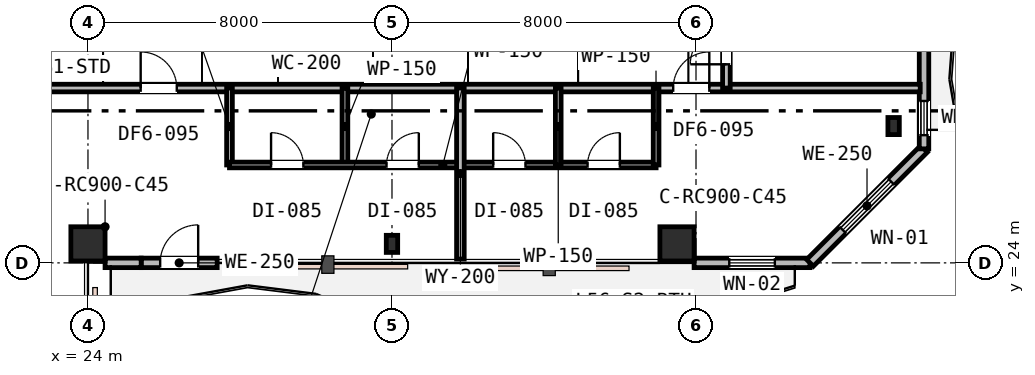
"""IFC4 building model, lengths in metres.
Left out: names, types, materials, properties, quantities, classifications, styles, units other than length and angle.
Written with IfcOpenShell. Run it as: python <this file> out.ifc"""

import sys

from ifc_helpers import new_model, si_unit, direction, frame, frame_2d, origin, origin_2d, place, context, subcontext, project, spatial, rectangle, i_section, extrude, element, fill, save


model = new_model("IFC4")
c1 = context("Model", 3, precision=1e-05, world=origin(), true_north=direction((0.0, 1.0)))
c2 = subcontext(c1, "Body", "Model", "MODEL_VIEW")
j1 = project(units=[si_unit("LENGTHUNIT", "METRE"), si_unit("PLANEANGLEUNIT", "RADIAN")], contexts=[c1])
p1 = place(None, origin())
s1 = spatial("IfcSite", under=j1, at=p1, CompositionType="ELEMENT")
p2 = place(p1, origin())
s2 = spatial("IfcBuilding", under=s1, at=p2, CompositionType="ELEMENT")
p3 = place(p2, frame((0.0, 0.0, 218.4)))
s3 = spatial("IfcBuildingStorey", under=s2, at=p3, CompositionType="ELEMENT", Elevation=218.4)
p4 = place(p3, frame((24.0, 24.5, 0.0), z_axis=(0.0, 0.0, 1.0), x_axis=(1.0, 0.0, 0.0)))
e1 = element("IfcColumn", 1, at=p4, inside=s3, PredefinedType="COLUMN", context=c2, shape_type="SweptSolid", body=[
    extrude(rectangle(XDim=0.9, YDim=0.9, at=origin_2d()), origin(), (0.0, 0.0, 1.0), 3.8),
])
p5 = place(p3, frame((32.0, 24.5, 0.0), z_axis=(0.0, 0.0, 1.0), x_axis=(1.0, 0.0, 0.0)))
e2 = element("IfcColumn", 2, at=p5, inside=s3, PredefinedType="COLUMN", context=c2, shape_type="SweptSolid", body=[
    extrude(i_section(OverallWidth=0.3, OverallDepth=0.45, WebThickness=0.014, FlangeThickness=0.026, FilletRadius=0.027, at=origin_2d()), origin(), (0.0, 0.0, 1.0), 3.8),
])
p6 = place(p3, frame((39.5, 24.5, 0.0), z_axis=(0.0, 0.0, 1.0), x_axis=(1.0, 0.0, 0.0)))
e3 = element("IfcColumn", 3, at=p6, inside=s3, PredefinedType="COLUMN", context=c2, shape_type="SweptSolid", body=[
    extrude(rectangle(XDim=0.9, YDim=0.9, at=origin_2d()), origin(), (0.0, 0.0, 1.0), 3.8),
])
p7 = place(p3, frame((45.2, 27.6, 0.0), z_axis=(0.0, 0.0, 1.0), x_axis=(1.0, 0.0, 0.0)))
e4 = element("IfcColumn", 4, at=p7, inside=s3, PredefinedType="COLUMN", context=c2, shape_type="SweptSolid", body=[
    extrude(i_section(OverallWidth=0.3, OverallDepth=0.45, WebThickness=0.014, FlangeThickness=0.026, FilletRadius=0.027, at=origin_2d()), origin(), (0.0, 0.0, 1.0), 3.8),
])
p8 = place(p3, frame((25.4, 24.0, 0.0), z_axis=(0.0, 0.0, 1.0), x_axis=(1.0, 0.0, 0.0)))
e5 = element("IfcWall", 5, at=p8, inside=s3, PredefinedType="STANDARD", context=c2, shape_type="SweptSolid", body=[
    extrude(rectangle(XDim=2.0, YDim=0.25, at=frame_2d((1.0, 0.0))), origin(), (0.0, 0.0, 1.0), 3.24),
])
p9 = place(p8, frame((0.5, 0.0, 0.0)))
e6 = element("IfcOpeningElement", 6, at=p9, cuts=e5, PredefinedType="OPENING", context=c2, shape_type="SweptSolid", body=[
    extrude(rectangle(XDim=1.0, YDim=2.15, at=frame_2d((0.5, 1.075))), frame((0.0, 0.135, 0.0), z_axis=(0.0, -1.0, 0.0), x_axis=(1.0, 0.0, 0.0)), (0.0, 0.0, 1.0), 0.27),
])
p10 = place(p3, frame((24.45, 24.0, 0.0), z_axis=(0.0, 0.0, 1.0), x_axis=(1.0, 0.0, 0.0)))
e7 = element("IfcWall", 7, at=p10, inside=s3, PredefinedType="STANDARD", context=c2, shape_type="SweptSolid", body=[
    extrude(rectangle(XDim=0.95, YDim=0.25, at=frame_2d((0.475, 0.0))), origin(), (0.0, 0.0, 1.0), 3.24),
])
p11 = place(p3, frame((39.95, 24.0, 0.0), z_axis=(0.0, 0.0, 1.0), x_axis=(1.0, 0.0, 0.0)))
e8 = element("IfcWall", 8, at=p11, inside=s3, PredefinedType="STANDARD", context=c2, shape_type="SweptSolid", body=[
    extrude(rectangle(XDim=3.05, YDim=0.25, at=frame_2d((1.525, 0.0))), origin(), (0.0, 0.0, 1.0), 3.53),
])
p12 = place(p11, frame((0.925, 0.0, 0.85)))
e9 = element("IfcOpeningElement", 9, at=p12, cuts=e8, PredefinedType="OPENING", context=c2, shape_type="SweptSolid", body=[
    extrude(rectangle(XDim=1.2, YDim=1.6, at=frame_2d((0.6, 0.8))), frame((0.0, 0.135, 0.0), z_axis=(0.0, -1.0, 0.0), x_axis=(1.0, 0.0, 0.0)), (0.0, 0.0, 1.0), 0.27),
])
p13 = place(p3, frame((43.0, 24.0, 0.0), z_axis=(0.0, 0.0, 1.0), x_axis=(0.707106781187, 0.707106781187, 0.0)))
e10 = element("IfcWall", 10, at=p13, inside=s3, PredefinedType="STANDARD", context=c2, shape_type="SweptSolid", body=[
    extrude(rectangle(XDim=4.243, YDim=0.25, at=frame_2d((2.121, 0.0))), origin(), (0.0, 0.0, 1.0), 3.53),
])
p14 = place(p13, frame((1.221, 0.0, 0.75)))
e11 = element("IfcOpeningElement", 11, at=p14, cuts=e10, PredefinedType="OPENING", context=c2, shape_type="SweptSolid", body=[
    extrude(rectangle(XDim=1.8, YDim=1.85, at=frame_2d((0.9, 0.925))), frame((0.0, 0.135, 0.0), z_axis=(0.0, -1.0, 0.0), x_axis=(1.0, 0.0, 0.0)), (0.0, 0.0, 1.0), 0.27),
])
p15 = place(p3, frame((46.0, 27.0, 0.0), z_axis=(0.0, 0.0, 1.0), x_axis=(0.0, 1.0, 0.0)))
e12 = element("IfcWall", 12, at=p15, inside=s3, PredefinedType="STANDARD", context=c2, shape_type="SweptSolid", body=[
    extrude(rectangle(XDim=2.9, YDim=0.25, at=frame_2d((1.45, 0.0))), origin(), (0.0, 0.0, 1.0), 3.53),
])
p16 = place(p15, frame((0.36, 0.0, 0.9)))
e13 = element("IfcOpeningElement", 13, at=p16, cuts=e12, PredefinedType="OPENING", context=c2, shape_type="SweptSolid", body=[
    extrude(rectangle(XDim=0.9, YDim=1.55, at=frame_2d((0.45, 0.775))), frame((0.0, 0.135, 0.0), z_axis=(0.0, -1.0, 0.0), x_axis=(1.0, 0.0, 0.0)), (0.0, 0.0, 1.0), 0.27),
])
p17 = place(p3, frame((13.6, 28.6, 0.0), z_axis=(0.0, 0.0, 1.0), x_axis=(1.0, 0.0, 0.0)))
e14 = element("IfcWall", 14, at=p17, inside=s3, PredefinedType="PARTITIONING", context=c2, shape_type="SweptSolid", body=[
    extrude(rectangle(XDim=32.3, YDim=0.2, at=frame_2d((16.15, 0.0))), origin(), (0.0, 0.0, 1.0), 2.92),
])
p18 = place(p17, frame((11.787, 0.0, 0.0)))
e15 = element("IfcOpeningElement", 15, at=p18, cuts=e14, PredefinedType="OPENING", context=c2, shape_type="SweptSolid", body=[
    extrude(rectangle(XDim=0.95, YDim=2.15, at=frame_2d((0.475, 1.075))), frame((0.0, 0.11, 0.0), z_axis=(0.0, -1.0, 0.0), x_axis=(1.0, 0.0, 0.0)), (0.0, 0.0, 1.0), 0.22),
])
p19 = place(p17, frame((25.8, 0.0, 0.0)))
e16 = element("IfcOpeningElement", 16, at=p19, cuts=e14, PredefinedType="OPENING", context=c2, shape_type="SweptSolid", body=[
    extrude(rectangle(XDim=0.95, YDim=2.15, at=frame_2d((0.475, 1.075))), frame((0.0, 0.11, 0.0), z_axis=(0.0, -1.0, 0.0), x_axis=(1.0, 0.0, 0.0)), (0.0, 0.0, 1.0), 0.22),
])
p20 = place(p3, frame((40.8, 28.6, 0.0), z_axis=(0.0, 0.0, 1.0), x_axis=(0.0, 1.0, 0.0)))
e17 = element("IfcWall", 17, at=p20, inside=s3, PredefinedType="PARTITIONING", context=c2, shape_type="SweptSolid", body=[
    extrude(rectangle(XDim=14.3, YDim=0.2, at=frame_2d((7.15, 0.0))), origin(), (0.0, 0.0, 1.0), 2.92),
])
p21 = place(p20, frame((0.625, 0.0, 0.0)))
e18 = element("IfcOpeningElement", 18, at=p21, cuts=e17, PredefinedType="OPENING", context=c2, shape_type="SweptSolid", body=[
    extrude(rectangle(XDim=0.95, YDim=2.15, at=frame_2d((0.475, 1.075))), frame((0.0, 0.11, 0.0), z_axis=(0.0, -1.0, 0.0), x_axis=(1.0, 0.0, 0.0)), (0.0, 0.0, 1.0), 0.22),
])
for number, where, z_axis, x_axis in (
    (19, (27.724, 26.576, 0.0), (0.0, 0.0, 1.0), (0.0, 1.0, 0.0)),
    (20, (30.762, 26.576, 0.0), (0.0, 0.0, 1.0), (0.0, 1.0, 0.0)),
):
    element("IfcWall", number, at=place(p3, frame(where, z_axis=z_axis, x_axis=x_axis)), inside=s3, PredefinedType="PARTITIONING", context=c2, shape_type="SweptSolid", body=[
        extrude(rectangle(XDim=2.024, YDim=0.15, at=frame_2d((1.012, 0.0))), origin(), (0.0, 0.0, 1.0), 3.53),
    ])
p22 = place(p3, frame((27.724, 26.576, 0.0), z_axis=(0.0, 0.0, 1.0), x_axis=(1.0, 0.0, 0.0)))
e21 = element("IfcWall", 21, at=p22, inside=s3, PredefinedType="PARTITIONING", context=c2, shape_type="SweptSolid", body=[
    extrude(rectangle(XDim=11.226, YDim=0.15, at=frame_2d((5.613, 0.0))), origin(), (0.0, 0.0, 1.0), 2.92),
])
p23 = place(p22, frame((1.094, 0.0, 0.0)))
e22 = element("IfcOpeningElement", 22, at=p23, cuts=e21, PredefinedType="OPENING", context=c2, shape_type="SweptSolid", body=[
    extrude(rectangle(XDim=0.85, YDim=2.15, at=frame_2d((0.425, 1.075))), frame((0.0, 0.085, 0.0), z_axis=(0.0, -1.0, 0.0), x_axis=(1.0, 0.0, 0.0)), (0.0, 0.0, 1.0), 0.17),
])
p24 = place(p22, frame((4.132, 0.0, 0.0)))
e23 = element("IfcOpeningElement", 23, at=p24, cuts=e21, PredefinedType="OPENING", context=c2, shape_type="SweptSolid", body=[
    extrude(rectangle(XDim=0.85, YDim=2.15, at=frame_2d((0.425, 1.075))), frame((0.0, 0.085, 0.0), z_axis=(0.0, -1.0, 0.0), x_axis=(1.0, 0.0, 0.0)), (0.0, 0.0, 1.0), 0.17),
])
p25 = place(p22, frame((6.939, 0.0, 0.0)))
e24 = element("IfcOpeningElement", 24, at=p25, cuts=e21, PredefinedType="OPENING", context=c2, shape_type="SweptSolid", body=[
    extrude(rectangle(XDim=0.85, YDim=2.15, at=frame_2d((0.425, 1.075))), frame((0.0, 0.085, 0.0), z_axis=(0.0, -1.0, 0.0), x_axis=(1.0, 0.0, 0.0)), (0.0, 0.0, 1.0), 0.17),
])
p26 = place(p22, frame((9.422, 0.0, 0.0)))
e25 = element("IfcOpeningElement", 25, at=p26, cuts=e21, PredefinedType="OPENING", context=c2, shape_type="SweptSolid", body=[
    extrude(rectangle(XDim=0.85, YDim=2.15, at=frame_2d((0.425, 1.075))), frame((0.0, 0.085, 0.0), z_axis=(0.0, -1.0, 0.0), x_axis=(1.0, 0.0, 0.0)), (0.0, 0.0, 1.0), 0.17),
])
p27 = place(p3, frame((33.8, 24.1, 0.0), z_axis=(0.0, 0.0, 1.0), x_axis=(0.0, 1.0, 0.0)))
e26 = element("IfcWall", 26, at=p27, inside=s3, PredefinedType="PARTITIONING", context=c2, shape_type="SweptSolid", body=[
    extrude(rectangle(XDim=4.5, YDim=0.2, at=frame_2d((2.25, 0.0))), origin(), (0.0, 0.0, 1.0), 3.24),
])
p28 = place(p3, frame((38.95, 26.576, 0.0), z_axis=(0.0, 0.0, 1.0), x_axis=(0.0, 1.0, 0.0)))
e27 = element("IfcWall", 27, at=p28, inside=s3, PredefinedType="PARTITIONING", context=c2, shape_type="SweptSolid", body=[
    extrude(rectangle(XDim=2.024, YDim=0.15, at=frame_2d((1.012, 0.0))), origin(), (0.0, 0.0, 1.0), 2.92),
])
p29 = place(p3, frame((36.375, 26.576, 0.0), z_axis=(0.0, 0.0, 1.0), x_axis=(0.0, 1.0, 0.0)))
e28 = element("IfcWall", 28, at=p29, inside=s3, PredefinedType="PARTITIONING", context=c2, shape_type="SweptSolid", body=[
    extrude(rectangle(XDim=2.024, YDim=0.15, at=frame_2d((1.012, 0.0))), origin(), (0.0, 0.0, 1.0), 3.53),
])
p30 = place(p9, origin())
e29 = element("IfcDoor", 29, at=p30, inside=s3, OperationType="SINGLE_SWING_RIGHT", PredefinedType="DOOR", context=c2, shape_type="SweptSolid", body=[
    extrude(rectangle(XDim=1.0, YDim=2.15, at=frame_2d((0.5, 1.075))), frame((0.0, 0.025, 0.0), z_axis=(0.0, -1.0, 0.0), x_axis=(1.0, 0.0, 0.0)), (0.0, 0.0, 1.0), 0.05),
])
fill(e6, e29)
p31 = place(p12, origin())
e30 = element("IfcWindow", 30, at=p31, inside=s3, PartitioningType="SINGLE_PANEL", PredefinedType="WINDOW", context=c2, shape_type="SweptSolid", body=[
    extrude(rectangle(XDim=1.2, YDim=1.6, at=frame_2d((0.6, 0.8))), frame((0.0, 0.03, 0.0), z_axis=(0.0, -1.0, 0.0), x_axis=(1.0, 0.0, 0.0)), (0.0, 0.0, 1.0), 0.06),
])
fill(e9, e30)
p32 = place(p14, origin())
e31 = element("IfcWindow", 31, at=p32, inside=s3, PartitioningType="SINGLE_PANEL", PredefinedType="WINDOW", context=c2, shape_type="SweptSolid", body=[
    extrude(rectangle(XDim=1.8, YDim=1.85, at=frame_2d((0.9, 0.925))), frame((0.0, 0.03, 0.0), z_axis=(0.0, -1.0, 0.0), x_axis=(1.0, 0.0, 0.0)), (0.0, 0.0, 1.0), 0.06),
])
fill(e11, e31)
p33 = place(p16, origin())
e32 = element("IfcWindow", 32, at=p33, inside=s3, PartitioningType="SINGLE_PANEL", PredefinedType="WINDOW", context=c2, shape_type="SweptSolid", body=[
    extrude(rectangle(XDim=0.9, YDim=1.55, at=frame_2d((0.45, 0.775))), frame((0.0, 0.03, 0.0), z_axis=(0.0, -1.0, 0.0), x_axis=(1.0, 0.0, 0.0)), (0.0, 0.0, 1.0), 0.06),
])
fill(e13, e32)
p34 = place(p21, origin())
e33 = element("IfcDoor", 33, at=p34, inside=s3, OperationType="SINGLE_SWING_LEFT", PredefinedType="DOOR", context=c2, shape_type="SweptSolid", body=[
    extrude(rectangle(XDim=0.95, YDim=2.15, at=frame_2d((0.475, 1.075))), frame((0.0, 0.025, 0.0), z_axis=(0.0, -1.0, 0.0), x_axis=(1.0, 0.0, 0.0)), (0.0, 0.0, 1.0), 0.05),
])
fill(e18, e33)
p35 = place(p18, origin())
e34 = element("IfcDoor", 34, at=p35, inside=s3, OperationType="SINGLE_SWING_LEFT", PredefinedType="DOOR", context=c2, shape_type="SweptSolid", body=[
    extrude(rectangle(XDim=0.95, YDim=2.15, at=frame_2d((0.475, 1.075))), frame((0.0, 0.025, 0.0), z_axis=(0.0, -1.0, 0.0), x_axis=(1.0, 0.0, 0.0)), (0.0, 0.0, 1.0), 0.05),
])
fill(e15, e34)
p36 = place(p23, origin())
e35 = element("IfcDoor", 35, at=p36, inside=s3, OperationType="SINGLE_SWING_LEFT", PredefinedType="DOOR", context=c2, shape_type="SweptSolid", body=[
    extrude(rectangle(XDim=0.85, YDim=2.15, at=frame_2d((0.425, 1.075))), frame((0.0, 0.025, 0.0), z_axis=(0.0, -1.0, 0.0), x_axis=(1.0, 0.0, 0.0)), (0.0, 0.0, 1.0), 0.05),
])
fill(e22, e35)
p37 = place(p24, origin())
e36 = element("IfcDoor", 36, at=p37, inside=s3, OperationType="SINGLE_SWING_RIGHT", PredefinedType="DOOR", context=c2, shape_type="SweptSolid", body=[
    extrude(rectangle(XDim=0.85, YDim=2.15, at=frame_2d((0.425, 1.075))), frame((0.0, 0.025, 0.0), z_axis=(0.0, -1.0, 0.0), x_axis=(1.0, 0.0, 0.0)), (0.0, 0.0, 1.0), 0.05),
])
fill(e23, e36)
p38 = place(p19, origin())
e37 = element("IfcDoor", 37, at=p38, inside=s3, OperationType="SINGLE_SWING_RIGHT", PredefinedType="DOOR", context=c2, shape_type="SweptSolid", body=[
    extrude(rectangle(XDim=0.95, YDim=2.15, at=frame_2d((0.475, 1.075))), frame((0.0, 0.025, 0.0), z_axis=(0.0, -1.0, 0.0), x_axis=(1.0, 0.0, 0.0)), (0.0, 0.0, 1.0), 0.05),
])
fill(e16, e37)
p39 = place(p25, origin())
e38 = element("IfcDoor", 38, at=p39, inside=s3, OperationType="SINGLE_SWING_LEFT", PredefinedType="DOOR", context=c2, shape_type="SweptSolid", body=[
    extrude(rectangle(XDim=0.85, YDim=2.15, at=frame_2d((0.425, 1.075))), frame((0.0, 0.025, 0.0), z_axis=(0.0, -1.0, 0.0), x_axis=(1.0, 0.0, 0.0)), (0.0, 0.0, 1.0), 0.05),
])
fill(e24, e38)
p40 = place(p26, origin())
e39 = element("IfcDoor", 39, at=p40, inside=s3, OperationType="SINGLE_SWING_RIGHT", PredefinedType="DOOR", context=c2, shape_type="SweptSolid", body=[
    extrude(rectangle(XDim=0.85, YDim=2.15, at=frame_2d((0.425, 1.075))), frame((0.0, 0.025, 0.0), z_axis=(0.0, -1.0, 0.0), x_axis=(1.0, 0.0, 0.0)), (0.0, 0.0, 1.0), 0.05),
])
fill(e25, e39)
save(model, sys.argv[1])
